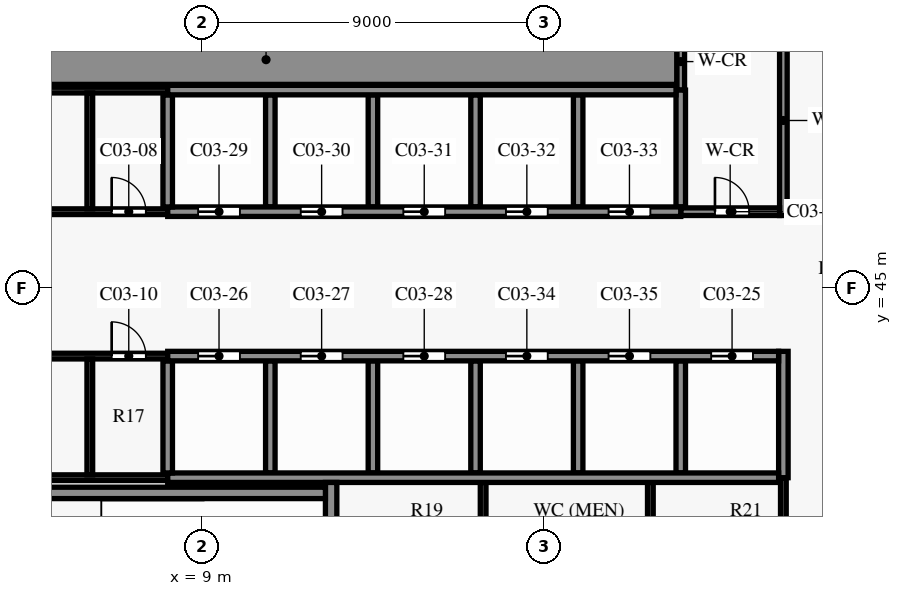
"""IFC4 building model, lengths in metres.
Left out: names, types, materials, properties, quantities, classifications, styles, units other than length and angle.
Written with IfcOpenShell. Run it as: python <this file> out.ifc"""

import sys

from ifc_helpers import new_model, si_unit, direction, frame, frame_2d, origin, place, context, subcontext, project, spatial, rectangle, extrude, element, fill, save


model = new_model("IFC4")
c1 = context("Model", 3, precision=1e-05, world=origin(), true_north=direction((0.0, 1.0)))
c2 = subcontext(c1, "Body", "Model", "MODEL_VIEW")
j1 = project(units=[si_unit("LENGTHUNIT", "METRE"), si_unit("PLANEANGLEUNIT", "RADIAN")], contexts=[c1])
p1 = place(None, origin())
s1 = spatial("IfcSite", under=j1, at=p1, CompositionType="ELEMENT")
p2 = place(p1, origin())
s2 = spatial("IfcBuilding", under=s1, at=p2, CompositionType="ELEMENT")
p3 = place(p2, frame((0.0, 0.0, 7.5)))
s3 = spatial("IfcBuildingStorey", under=s2, at=p3, CompositionType="ELEMENT", Elevation=7.5)
p4 = place(p3, frame((4.55, 39.6, 0.0), z_axis=(0.0, 0.0, 1.0), x_axis=(1.0, 0.0, 0.0)))
e1 = element("IfcWall", 1, at=p4, inside=s3, PredefinedType="SHEAR", context=c2, shape_type="SweptSolid", body=[
    extrude(rectangle(XDim=7.7, YDim=0.3, at=frame_2d((3.85, 0.0))), origin(), (0.0, 0.0, 1.0), 6.7),
])
p5 = place(p3, frame((0.15, 40.0, 0.0), z_axis=(0.0, 0.0, 1.0), x_axis=(1.0, 0.0, 0.0)))
e2 = element("IfcWall", 2, at=p5, inside=s3, PredefinedType="PARTITIONING", context=c2, shape_type="SweptSolid", body=[
    extrude(rectangle(XDim=7.95, YDim=0.15, at=frame_2d((3.975, 0.0))), origin(), (0.0, 0.0, 1.0), 6.7),
])
p6 = place(p3, frame((8.1, 40.0, 0.0), z_axis=(0.0, 0.0, 1.0), x_axis=(1.0, 0.0, 0.0)))
e3 = element("IfcWall", 3, at=p6, inside=s3, PredefinedType="SHEAR", context=c2, shape_type="SweptSolid", body=[
    extrude(rectangle(XDim=16.075, YDim=0.25, at=frame_2d((8.038, 0.0))), origin(), (0.0, 0.0, 1.0), 6.7),
])
p7 = place(p3, frame((0.15, 43.2, 0.0), z_axis=(0.0, 0.0, 1.0), x_axis=(1.0, 0.0, 0.0)))
e4 = element("IfcWall", 4, at=p7, inside=s3, PredefinedType="PARTITIONING", context=c2, shape_type="SweptSolid", body=[
    extrude(rectangle(XDim=7.95, YDim=0.15, at=frame_2d((3.975, 0.0))), origin(), (0.0, 0.0, 1.0), 6.7),
])
p8 = place(p7, frame((2.75, 0.0, 0.0)))
e5 = element("IfcOpeningElement", 5, at=p8, cuts=e4, PredefinedType="OPENING", context=c2, shape_type="SweptSolid", body=[
    extrude(rectangle(XDim=0.9, YDim=2.1, at=frame_2d((0.45, 1.05))), frame((0.0, 0.085, 0.0), z_axis=(0.0, -1.0, 0.0), x_axis=(1.0, 0.0, 0.0)), (0.0, 0.0, 1.0), 0.17),
])
p9 = place(p7, frame((6.475, 0.0, 0.0)))
e6 = element("IfcOpeningElement", 6, at=p9, cuts=e4, PredefinedType="OPENING", context=c2, shape_type="SweptSolid", body=[
    extrude(rectangle(XDim=0.9, YDim=2.1, at=frame_2d((0.45, 1.05))), frame((0.0, 0.085, 0.0), z_axis=(0.0, -1.0, 0.0), x_axis=(1.0, 0.0, 0.0)), (0.0, 0.0, 1.0), 0.17),
])
p10 = place(p3, frame((8.1, 43.2, 0.0), z_axis=(0.0, 0.0, 1.0), x_axis=(1.0, 0.0, 0.0)))
e7 = element("IfcWall", 7, at=p10, inside=s3, PredefinedType="SHEAR", context=c2, shape_type="SweptSolid", body=[
    extrude(rectangle(XDim=16.075, YDim=0.25, at=frame_2d((8.038, 0.0))), origin(), (0.0, 0.0, 1.0), 6.7),
])
p11 = place(p10, frame((14.3, 0.0, 0.0)))
e8 = element("IfcOpeningElement", 8, at=p11, cuts=e7, PredefinedType="OPENING", context=c2, shape_type="SweptSolid", body=[
    extrude(rectangle(XDim=1.1, YDim=2.1, at=frame_2d((0.55, 1.05))), frame((0.0, 0.135, 0.0), z_axis=(0.0, -1.0, 0.0), x_axis=(1.0, 0.0, 0.0)), (0.0, 0.0, 1.0), 0.27),
])
p12 = place(p10, frame((0.8, 0.0, 0.0)))
e9 = element("IfcOpeningElement", 9, at=p12, cuts=e7, PredefinedType="OPENING", context=c2, shape_type="SweptSolid", body=[
    extrude(rectangle(XDim=1.1, YDim=2.1, at=frame_2d((0.55, 1.05))), frame((0.0, 0.135, 0.0), z_axis=(0.0, -1.0, 0.0), x_axis=(1.0, 0.0, 0.0)), (0.0, 0.0, 1.0), 0.27),
])
p13 = place(p10, frame((3.5, 0.0, 0.0)))
e10 = element("IfcOpeningElement", 10, at=p13, cuts=e7, PredefinedType="OPENING", context=c2, shape_type="SweptSolid", body=[
    extrude(rectangle(XDim=1.1, YDim=2.1, at=frame_2d((0.55, 1.05))), frame((0.0, 0.135, 0.0), z_axis=(0.0, -1.0, 0.0), x_axis=(1.0, 0.0, 0.0)), (0.0, 0.0, 1.0), 0.27),
])
p14 = place(p10, frame((6.2, 0.0, 0.0)))
e11 = element("IfcOpeningElement", 11, at=p14, cuts=e7, PredefinedType="OPENING", context=c2, shape_type="SweptSolid", body=[
    extrude(rectangle(XDim=1.1, YDim=2.1, at=frame_2d((0.55, 1.05))), frame((0.0, 0.135, 0.0), z_axis=(0.0, -1.0, 0.0), x_axis=(1.0, 0.0, 0.0)), (0.0, 0.0, 1.0), 0.27),
])
p15 = place(p10, frame((8.9, 0.0, 0.0)))
e12 = element("IfcOpeningElement", 12, at=p15, cuts=e7, PredefinedType="OPENING", context=c2, shape_type="SweptSolid", body=[
    extrude(rectangle(XDim=1.1, YDim=2.1, at=frame_2d((0.55, 1.05))), frame((0.0, 0.135, 0.0), z_axis=(0.0, -1.0, 0.0), x_axis=(1.0, 0.0, 0.0)), (0.0, 0.0, 1.0), 0.27),
])
p16 = place(p10, frame((11.6, 0.0, 0.0)))
e13 = element("IfcOpeningElement", 13, at=p16, cuts=e7, PredefinedType="OPENING", context=c2, shape_type="SweptSolid", body=[
    extrude(rectangle(XDim=1.1, YDim=2.1, at=frame_2d((0.55, 1.05))), frame((0.0, 0.135, 0.0), z_axis=(0.0, -1.0, 0.0), x_axis=(1.0, 0.0, 0.0)), (0.0, 0.0, 1.0), 0.27),
])
p17 = place(p3, frame((0.15, 47.0, 0.0), z_axis=(0.0, 0.0, 1.0), x_axis=(1.0, 0.0, 0.0)))
e14 = element("IfcWall", 14, at=p17, inside=s3, PredefinedType="PARTITIONING", context=c2, shape_type="SweptSolid", body=[
    extrude(rectangle(XDim=7.95, YDim=0.15, at=frame_2d((3.975, 0.0))), origin(), (0.0, 0.0, 1.0), 6.7),
])
p18 = place(p17, frame((2.75, 0.0, 0.0)))
e15 = element("IfcOpeningElement", 15, at=p18, cuts=e14, PredefinedType="OPENING", context=c2, shape_type="SweptSolid", body=[
    extrude(rectangle(XDim=0.9, YDim=2.1, at=frame_2d((0.45, 1.05))), frame((0.0, 0.085, 0.0), z_axis=(0.0, -1.0, 0.0), x_axis=(1.0, 0.0, 0.0)), (0.0, 0.0, 1.0), 0.17),
])
p19 = place(p17, frame((6.475, 0.0, 0.0)))
e16 = element("IfcOpeningElement", 16, at=p19, cuts=e14, PredefinedType="OPENING", context=c2, shape_type="SweptSolid", body=[
    extrude(rectangle(XDim=0.9, YDim=2.1, at=frame_2d((0.45, 1.05))), frame((0.0, 0.085, 0.0), z_axis=(0.0, -1.0, 0.0), x_axis=(1.0, 0.0, 0.0)), (0.0, 0.0, 1.0), 0.17),
])
p20 = place(p3, frame((21.6, 47.0, 0.0), z_axis=(0.0, 0.0, 1.0), x_axis=(1.0, 0.0, 0.0)))
e17 = element("IfcWall", 17, at=p20, inside=s3, PredefinedType="PARTITIONING", context=c2, shape_type="SweptSolid", body=[
    extrude(rectangle(XDim=2.6, YDim=0.2, at=frame_2d((1.3, 0.0))), origin(), (0.0, 0.0, 1.0), 6.7),
])
p21 = place(p20, frame((0.9, 0.0, 0.0)))
e18 = element("IfcOpeningElement", 18, at=p21, cuts=e17, PredefinedType="OPENING", context=c2, shape_type="SweptSolid", body=[
    extrude(rectangle(XDim=0.9, YDim=2.1, at=frame_2d((0.45, 1.05))), frame((0.0, 0.11, 0.0), z_axis=(0.0, -1.0, 0.0), x_axis=(1.0, 0.0, 0.0)), (0.0, 0.0, 1.0), 0.22),
])
p22 = place(p3, frame((8.1, 47.0, 0.0), z_axis=(0.0, 0.0, 1.0), x_axis=(1.0, 0.0, 0.0)))
e19 = element("IfcWall", 19, at=p22, inside=s3, PredefinedType="SHEAR", context=c2, shape_type="SweptSolid", body=[
    extrude(rectangle(XDim=13.5, YDim=0.25, at=frame_2d((6.75, 0.0))), origin(), (0.0, 0.0, 1.0), 6.7),
])
p23 = place(p22, frame((0.8, 0.0, 0.0)))
e20 = element("IfcOpeningElement", 20, at=p23, cuts=e19, PredefinedType="OPENING", context=c2, shape_type="SweptSolid", body=[
    extrude(rectangle(XDim=1.1, YDim=2.1, at=frame_2d((0.55, 1.05))), frame((0.0, 0.135, 0.0), z_axis=(0.0, -1.0, 0.0), x_axis=(1.0, 0.0, 0.0)), (0.0, 0.0, 1.0), 0.27),
])
p24 = place(p22, frame((3.5, 0.0, 0.0)))
e21 = element("IfcOpeningElement", 21, at=p24, cuts=e19, PredefinedType="OPENING", context=c2, shape_type="SweptSolid", body=[
    extrude(rectangle(XDim=1.1, YDim=2.1, at=frame_2d((0.55, 1.05))), frame((0.0, 0.135, 0.0), z_axis=(0.0, -1.0, 0.0), x_axis=(1.0, 0.0, 0.0)), (0.0, 0.0, 1.0), 0.27),
])
p25 = place(p22, frame((6.2, 0.0, 0.0)))
e22 = element("IfcOpeningElement", 22, at=p25, cuts=e19, PredefinedType="OPENING", context=c2, shape_type="SweptSolid", body=[
    extrude(rectangle(XDim=1.1, YDim=2.1, at=frame_2d((0.55, 1.05))), frame((0.0, 0.135, 0.0), z_axis=(0.0, -1.0, 0.0), x_axis=(1.0, 0.0, 0.0)), (0.0, 0.0, 1.0), 0.27),
])
p26 = place(p22, frame((8.9, 0.0, 0.0)))
e23 = element("IfcOpeningElement", 23, at=p26, cuts=e19, PredefinedType="OPENING", context=c2, shape_type="SweptSolid", body=[
    extrude(rectangle(XDim=1.1, YDim=2.1, at=frame_2d((0.55, 1.05))), frame((0.0, 0.135, 0.0), z_axis=(0.0, -1.0, 0.0), x_axis=(1.0, 0.0, 0.0)), (0.0, 0.0, 1.0), 0.27),
])
p27 = place(p22, frame((11.6, 0.0, 0.0)))
e24 = element("IfcOpeningElement", 24, at=p27, cuts=e19, PredefinedType="OPENING", context=c2, shape_type="SweptSolid", body=[
    extrude(rectangle(XDim=1.1, YDim=2.1, at=frame_2d((0.55, 1.05))), frame((0.0, 0.135, 0.0), z_axis=(0.0, -1.0, 0.0), x_axis=(1.0, 0.0, 0.0)), (0.0, 0.0, 1.0), 0.27),
])
p28 = place(p3, frame((0.15, 50.2, 0.0), z_axis=(0.0, 0.0, 1.0), x_axis=(1.0, 0.0, 0.0)))
e25 = element("IfcWall", 25, at=p28, inside=s3, PredefinedType="PARTITIONING", context=c2, shape_type="SweptSolid", body=[
    extrude(rectangle(XDim=7.95, YDim=0.15, at=frame_2d((3.975, 0.0))), origin(), (0.0, 0.0, 1.0), 6.7),
])
p29 = place(p3, frame((8.1, 50.2, 0.0), z_axis=(0.0, 0.0, 1.0), x_axis=(1.0, 0.0, 0.0)))
e26 = element("IfcWall", 26, at=p29, inside=s3, PredefinedType="SHEAR", context=c2, shape_type="SweptSolid", body=[
    extrude(rectangle(XDim=13.375, YDim=0.25, at=frame_2d((6.688, 0.0))), origin(), (0.0, 0.0, 1.0), 6.7),
])
p30 = place(p3, frame((-0.125, 51.0, 0.0), z_axis=(0.0, 0.0, 1.0), x_axis=(1.0, 0.0, 0.0)))
e27 = element("IfcWall", 27, at=p30, inside=s3, PredefinedType="SHEAR", context=c2, shape_type="SweptSolid", body=[
    extrude(rectangle(XDim=21.625, YDim=1.3, at=frame_2d((10.812, 0.0))), origin(), (0.0, 0.0, 1.0), 6.7),
])
for number, where, z_axis, x_axis in (
    (28, (6.05, 40.075, 0.0), (0.0, 0.0, 1.0), (0.0, 1.0, 0.0)),
    (29, (6.05, 47.075, 0.0), (0.0, 0.0, 1.0), (0.0, 1.0, 0.0)),
):
    element("IfcWall", number, at=place(p3, frame(where, z_axis=z_axis, x_axis=x_axis)), inside=s3, PredefinedType="PARTITIONING", context=c2, shape_type="SweptSolid", body=[
        extrude(rectangle(XDim=3.05, YDim=0.15, at=frame_2d((1.525, 0.0))), origin(), (0.0, 0.0, 1.0), 6.7),
    ])
for number, where, z_axis, x_axis in (
    (30, (8.1, 40.125, 0.0), (0.0, 0.0, 1.0), (0.0, 1.0, 0.0)),
    (31, (8.1, 47.125, 0.0), (0.0, 0.0, 1.0), (0.0, 1.0, 0.0)),
    (32, (10.8, 40.125, 0.0), (0.0, 0.0, 1.0), (0.0, 1.0, 0.0)),
    (33, (10.8, 47.125, 0.0), (0.0, 0.0, 1.0), (0.0, 1.0, 0.0)),
):
    element("IfcWall", number, at=place(p3, frame(where, z_axis=z_axis, x_axis=x_axis)), inside=s3, PredefinedType="SHEAR", context=c2, shape_type="SweptSolid", body=[
        extrude(rectangle(XDim=2.95, YDim=0.25, at=frame_2d((1.475, 0.0))), origin(), (0.0, 0.0, 1.0), 6.7),
    ])
p31 = place(p3, frame((12.4, 36.15, 0.0), z_axis=(0.0, 0.0, 1.0), x_axis=(0.0, 1.0, 0.0)))
e34 = element("IfcWall", 34, at=p31, inside=s3, PredefinedType="SHEAR", context=c2, shape_type="SweptSolid", body=[
    extrude(rectangle(XDim=3.725, YDim=0.3, at=frame_2d((1.863, 0.0))), origin(), (0.0, 0.0, 1.0), 6.7),
])
for number, where, z_axis, x_axis in (
    (35, (13.5, 40.125, 0.0), (0.0, 0.0, 1.0), (0.0, 1.0, 0.0)),
    (36, (13.5, 47.125, 0.0), (0.0, 0.0, 1.0), (0.0, 1.0, 0.0)),
    (37, (16.2, 40.125, 0.0), (0.0, 0.0, 1.0), (0.0, 1.0, 0.0)),
    (38, (16.2, 47.125, 0.0), (0.0, 0.0, 1.0), (0.0, 1.0, 0.0)),
):
    element("IfcWall", number, at=place(p3, frame(where, z_axis=z_axis, x_axis=x_axis)), inside=s3, PredefinedType="SHEAR", context=c2, shape_type="SweptSolid", body=[
        extrude(rectangle(XDim=2.95, YDim=0.25, at=frame_2d((1.475, 0.0))), origin(), (0.0, 0.0, 1.0), 6.7),
    ])
p32 = place(p3, frame((16.4, 36.075, 0.0), z_axis=(0.0, 0.0, 1.0), x_axis=(0.0, 1.0, 0.0)))
e39 = element("IfcWall", 39, at=p32, inside=s3, PredefinedType="PARTITIONING", context=c2, shape_type="SweptSolid", body=[
    extrude(rectangle(XDim=3.8, YDim=0.15, at=frame_2d((1.9, 0.0))), origin(), (0.0, 0.0, 1.0), 6.7),
])
for number, where, z_axis, x_axis in (
    (40, (18.9, 40.125, 0.0), (0.0, 0.0, 1.0), (0.0, 1.0, 0.0)),
    (41, (18.9, 47.125, 0.0), (0.0, 0.0, 1.0), (0.0, 1.0, 0.0)),
):
    element("IfcWall", number, at=place(p3, frame(where, z_axis=z_axis, x_axis=x_axis)), inside=s3, PredefinedType="SHEAR", context=c2, shape_type="SweptSolid", body=[
        extrude(rectangle(XDim=2.95, YDim=0.25, at=frame_2d((1.475, 0.0))), origin(), (0.0, 0.0, 1.0), 6.7),
    ])
p33 = place(p3, frame((20.8, 36.075, 0.0), z_axis=(0.0, 0.0, 1.0), x_axis=(0.0, 1.0, 0.0)))
e42 = element("IfcWall", 42, at=p33, inside=s3, PredefinedType="PARTITIONING", context=c2, shape_type="SweptSolid", body=[
    extrude(rectangle(XDim=3.8, YDim=0.15, at=frame_2d((1.9, 0.0))), origin(), (0.0, 0.0, 1.0), 6.7),
])
p34 = place(p3, frame((21.6, 50.2, 0.0), z_axis=(0.0, 0.0, 1.0), x_axis=(0.0, 1.0, 0.0)))
e43 = element("IfcWall", 43, at=p34, inside=s3, PredefinedType="PARTITIONING", context=c2, shape_type="SweptSolid", body=[
    extrude(rectangle(XDim=1.5, YDim=0.2, at=frame_2d((0.75, 0.0))), origin(), (0.0, 0.0, 1.0), 6.7),
])
p35 = place(p3, frame((21.6, 40.125, 0.0), z_axis=(0.0, 0.0, 1.0), x_axis=(0.0, 1.0, 0.0)))
e44 = element("IfcWall", 44, at=p35, inside=s3, PredefinedType="SHEAR", context=c2, shape_type="SweptSolid", body=[
    extrude(rectangle(XDim=2.95, YDim=0.25, at=frame_2d((1.475, 0.0))), origin(), (0.0, 0.0, 1.0), 6.7),
])
p36 = place(p3, frame((21.6, 47.125, 0.0), z_axis=(0.0, 0.0, 1.0), x_axis=(0.0, 1.0, 0.0)))
e45 = element("IfcWall", 45, at=p36, inside=s3, PredefinedType="SHEAR", context=c2, shape_type="SweptSolid", body=[
    extrude(rectangle(XDim=3.075, YDim=0.25, at=frame_2d((1.538, 0.0))), origin(), (0.0, 0.0, 1.0), 6.7),
])
p37 = place(p3, frame((24.3, 35.925, 0.0), z_axis=(0.0, 0.0, 1.0), x_axis=(0.0, 1.0, 0.0)))
e46 = element("IfcWall", 46, at=p37, inside=s3, PredefinedType="SHEAR", context=c2, shape_type="SweptSolid", body=[
    extrude(rectangle(XDim=4.075, YDim=0.15, at=frame_2d((2.038, 0.0))), origin(), (0.0, 0.0, 1.0), 6.7),
])
p38 = place(p3, frame((24.3, 46.9, 0.0), z_axis=(0.0, 0.0, 1.0), x_axis=(0.0, 1.0, 0.0)))
e47 = element("IfcWall", 47, at=p38, inside=s3, PredefinedType="SHEAR", context=c2, shape_type="SweptSolid", body=[
    extrude(rectangle(XDim=5.0, YDim=0.2, at=frame_2d((2.5, 0.0))), origin(), (0.0, 0.0, 1.0), 6.7),
])
p39 = place(p3, frame((24.3, 40.0, 0.0), z_axis=(0.0, 0.0, 1.0), x_axis=(0.0, 1.0, 0.0)))
e48 = element("IfcWall", 48, at=p39, inside=s3, PredefinedType="SHEAR", context=c2, shape_type="SweptSolid", body=[
    extrude(rectangle(XDim=3.325, YDim=0.25, at=frame_2d((1.663, 0.0))), origin(), (0.0, 0.0, 1.0), 6.7),
])
p40 = place(p21, origin())
e49 = element("IfcDoor", 49, at=p40, inside=s3, OperationType="SINGLE_SWING_LEFT", PredefinedType="DOOR", context=c2, shape_type="SweptSolid", body=[
    extrude(rectangle(XDim=0.9, YDim=2.1, at=frame_2d((0.45, 1.05))), frame((0.0, 0.025, 0.0), z_axis=(0.0, -1.0, 0.0), x_axis=(1.0, 0.0, 0.0)), (0.0, 0.0, 1.0), 0.05),
])
fill(e18, e49)
p41 = place(p19, origin())
e50 = element("IfcDoor", 50, at=p41, inside=s3, OperationType="SINGLE_SWING_LEFT", PredefinedType="DOOR", context=c2, shape_type="SweptSolid", body=[
    extrude(rectangle(XDim=0.9, YDim=2.1, at=frame_2d((0.45, 1.05))), frame((0.0, 0.025, 0.0), z_axis=(0.0, -1.0, 0.0), x_axis=(1.0, 0.0, 0.0)), (0.0, 0.0, 1.0), 0.05),
])
fill(e16, e50)
p42 = place(p9, origin())
e51 = element("IfcDoor", 51, at=p42, inside=s3, OperationType="SINGLE_SWING_RIGHT", PredefinedType="DOOR", context=c2, shape_type="SweptSolid", body=[
    extrude(rectangle(XDim=0.9, YDim=2.1, at=frame_2d((0.45, 1.05))), frame((0.0, 0.025, 0.0), z_axis=(0.0, -1.0, 0.0), x_axis=(1.0, 0.0, 0.0)), (0.0, 0.0, 1.0), 0.05),
])
fill(e6, e51)
p43 = place(p11, origin())
e52 = element("IfcDoor", 52, at=p43, inside=s3, OperationType="DOUBLE_DOOR_SLIDING", PredefinedType="DOOR", context=c2, shape_type="SweptSolid", body=[
    extrude(rectangle(XDim=1.1, YDim=2.1, at=frame_2d((0.55, 1.05))), frame((0.0, 0.025, 0.0), z_axis=(0.0, -1.0, 0.0), x_axis=(1.0, 0.0, 0.0)), (0.0, 0.0, 1.0), 0.05),
])
fill(e8, e52)
p44 = place(p12, origin())
e53 = element("IfcDoor", 53, at=p44, inside=s3, OperationType="DOUBLE_DOOR_SLIDING", PredefinedType="DOOR", context=c2, shape_type="SweptSolid", body=[
    extrude(rectangle(XDim=1.1, YDim=2.1, at=frame_2d((0.55, 1.05))), frame((0.0, 0.025, 0.0), z_axis=(0.0, -1.0, 0.0), x_axis=(1.0, 0.0, 0.0)), (0.0, 0.0, 1.0), 0.05),
])
fill(e9, e53)
p45 = place(p13, origin())
e54 = element("IfcDoor", 54, at=p45, inside=s3, OperationType="DOUBLE_DOOR_SLIDING", PredefinedType="DOOR", context=c2, shape_type="SweptSolid", body=[
    extrude(rectangle(XDim=1.1, YDim=2.1, at=frame_2d((0.55, 1.05))), frame((0.0, 0.025, 0.0), z_axis=(0.0, -1.0, 0.0), x_axis=(1.0, 0.0, 0.0)), (0.0, 0.0, 1.0), 0.05),
])
fill(e10, e54)
p46 = place(p14, origin())
e55 = element("IfcDoor", 55, at=p46, inside=s3, OperationType="DOUBLE_DOOR_SLIDING", PredefinedType="DOOR", context=c2, shape_type="SweptSolid", body=[
    extrude(rectangle(XDim=1.1, YDim=2.1, at=frame_2d((0.55, 1.05))), frame((0.0, 0.025, 0.0), z_axis=(0.0, -1.0, 0.0), x_axis=(1.0, 0.0, 0.0)), (0.0, 0.0, 1.0), 0.05),
])
fill(e11, e55)
p47 = place(p23, origin())
e56 = element("IfcDoor", 56, at=p47, inside=s3, OperationType="DOUBLE_DOOR_SLIDING", PredefinedType="DOOR", context=c2, shape_type="SweptSolid", body=[
    extrude(rectangle(XDim=1.1, YDim=2.1, at=frame_2d((0.55, 1.05))), frame((0.0, 0.025, 0.0), z_axis=(0.0, -1.0, 0.0), x_axis=(1.0, 0.0, 0.0)), (0.0, 0.0, 1.0), 0.05),
])
fill(e20, e56)
p48 = place(p24, origin())
e57 = element("IfcDoor", 57, at=p48, inside=s3, OperationType="DOUBLE_DOOR_SLIDING", PredefinedType="DOOR", context=c2, shape_type="SweptSolid", body=[
    extrude(rectangle(XDim=1.1, YDim=2.1, at=frame_2d((0.55, 1.05))), frame((0.0, 0.025, 0.0), z_axis=(0.0, -1.0, 0.0), x_axis=(1.0, 0.0, 0.0)), (0.0, 0.0, 1.0), 0.05),
])
fill(e21, e57)
p49 = place(p25, origin())
e58 = element("IfcDoor", 58, at=p49, inside=s3, OperationType="DOUBLE_DOOR_SLIDING", PredefinedType="DOOR", context=c2, shape_type="SweptSolid", body=[
    extrude(rectangle(XDim=1.1, YDim=2.1, at=frame_2d((0.55, 1.05))), frame((0.0, 0.025, 0.0), z_axis=(0.0, -1.0, 0.0), x_axis=(1.0, 0.0, 0.0)), (0.0, 0.0, 1.0), 0.05),
])
fill(e22, e58)
p50 = place(p26, origin())
e59 = element("IfcDoor", 59, at=p50, inside=s3, OperationType="DOUBLE_DOOR_SLIDING", PredefinedType="DOOR", context=c2, shape_type="SweptSolid", body=[
    extrude(rectangle(XDim=1.1, YDim=2.1, at=frame_2d((0.55, 1.05))), frame((0.0, 0.025, 0.0), z_axis=(0.0, -1.0, 0.0), x_axis=(1.0, 0.0, 0.0)), (0.0, 0.0, 1.0), 0.05),
])
fill(e23, e59)
p51 = place(p27, origin())
e60 = element("IfcDoor", 60, at=p51, inside=s3, OperationType="DOUBLE_DOOR_SLIDING", PredefinedType="DOOR", context=c2, shape_type="SweptSolid", body=[
    extrude(rectangle(XDim=1.1, YDim=2.1, at=frame_2d((0.55, 1.05))), frame((0.0, 0.025, 0.0), z_axis=(0.0, -1.0, 0.0), x_axis=(1.0, 0.0, 0.0)), (0.0, 0.0, 1.0), 0.05),
])
fill(e24, e60)
p52 = place(p15, origin())
e61 = element("IfcDoor", 61, at=p52, inside=s3, OperationType="DOUBLE_DOOR_SLIDING", PredefinedType="DOOR", context=c2, shape_type="SweptSolid", body=[
    extrude(rectangle(XDim=1.1, YDim=2.1, at=frame_2d((0.55, 1.05))), frame((0.0, 0.025, 0.0), z_axis=(0.0, -1.0, 0.0), x_axis=(1.0, 0.0, 0.0)), (0.0, 0.0, 1.0), 0.05),
])
fill(e12, e61)
p53 = place(p16, origin())
e62 = element("IfcDoor", 62, at=p53, inside=s3, OperationType="DOUBLE_DOOR_SLIDING", PredefinedType="DOOR", context=c2, shape_type="SweptSolid", body=[
    extrude(rectangle(XDim=1.1, YDim=2.1, at=frame_2d((0.55, 1.05))), frame((0.0, 0.025, 0.0), z_axis=(0.0, -1.0, 0.0), x_axis=(1.0, 0.0, 0.0)), (0.0, 0.0, 1.0), 0.05),
])
fill(e13, e62)
save(model, sys.argv[1])
